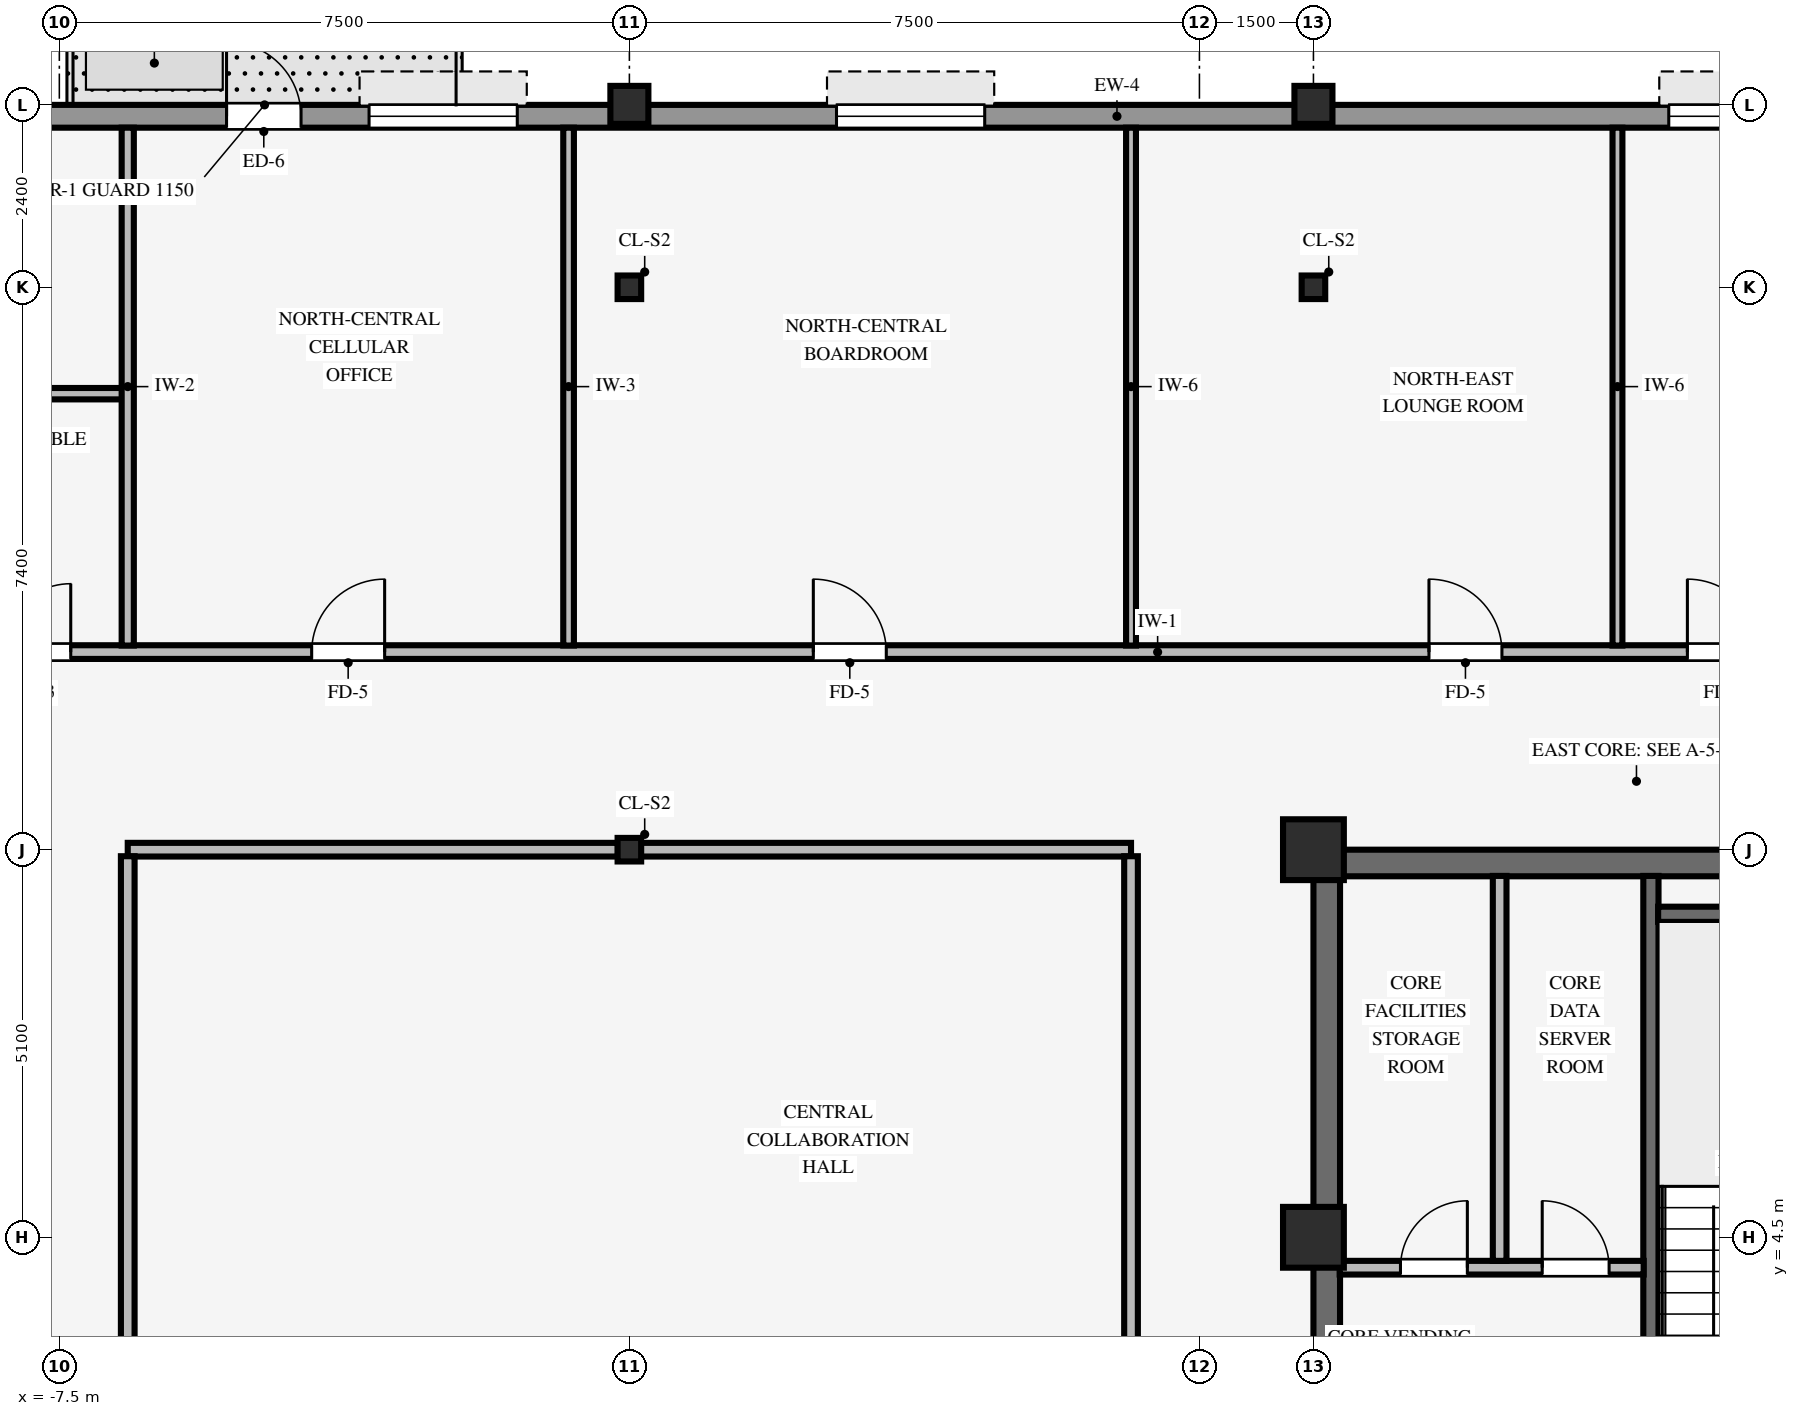
"""IFC4 building model, lengths in metres.
Left out: names, types, materials, properties, quantities, classifications, styles, units other than length and angle.
Written with IfcOpenShell. Run it as: python <this file> out.ifc"""

import sys

from ifc_helpers import new_model, si_unit, direction, frame, frame_2d, origin, origin_2d, place, context, subcontext, project, spatial, rectangle, hollow_rectangle, i_section, extrude, source, transform, mapped, element, fill, save


model = new_model("IFC4")
c1 = context("Model", 3, precision=1e-05, world=origin(), true_north=direction((0.0, 1.0)))
c2 = subcontext(c1, "Body", "Model", "MODEL_VIEW")
j1 = project(units=[si_unit("LENGTHUNIT", "METRE"), si_unit("PLANEANGLEUNIT", "RADIAN")], contexts=[c1])
p1 = place(None, origin())
s1 = spatial("IfcSite", under=j1, at=p1, CompositionType="ELEMENT")
p2 = place(p1, origin())
s2 = spatial("IfcBuilding", under=s1, at=p2, CompositionType="ELEMENT")
p3 = place(p2, frame((0.0, 0.0, 257.95)))
s3 = spatial("IfcBuildingStorey", under=s2, at=p3, CompositionType="ELEMENT", Elevation=257.95)
p4 = place(p3, frame((9.0, 9.425, 0.0), z_axis=(0.0, 0.0, 1.0), x_axis=(1.0, 0.0, 0.0)))
e1 = element("IfcWall", 1, at=p4, inside=s3, PredefinedType="SHEAR", context=c2, shape_type="SweptSolid", body=[
    extrude(rectangle(XDim=8.5, YDim=0.35, at=frame_2d((4.25, 0.0))), origin(), (0.0, 0.0, 1.0), 3.37),
])
p5 = place(p3, frame((9.175, -9.255, 0.0), z_axis=(0.0, 0.0, 1.0), x_axis=(0.0, 1.0, 0.0)))
e2 = element("IfcWall", 2, at=p5, inside=s3, PredefinedType="SHEAR", context=c2, shape_type="SweptSolid", body=[
    extrude(rectangle(XDim=18.51, YDim=0.35, at=frame_2d((9.255, 0.0))), origin(), (0.0, 0.0, 1.0), 3.37),
])
p6 = place(p5, frame((8.655, 0.0, 0.0)))
e3 = element("IfcOpeningElement", 3, at=p6, cuts=e2, PredefinedType="OPENING", context=c2, shape_type="SweptSolid", body=[
    extrude(rectangle(XDim=1.2, YDim=2.15, at=frame_2d((0.6, 1.075))), frame((0.0, 0.185, 0.0), z_axis=(0.0, -1.0, 0.0), x_axis=(1.0, 0.0, 0.0)), (0.0, 0.0, 1.0), 0.37),
])
for number, where, z_axis, x_axis in (
    (4, (9.0, 4.5, 0.0), (0.0, 0.0, 1.0), (1.0, 0.0, 0.0)),
    (5, (9.0, 9.6, 0.0), (0.0, 0.0, 1.0), (1.0, 0.0, 0.0)),
):
    element("IfcColumn", number, at=place(p3, frame(where, z_axis=z_axis, x_axis=x_axis)), inside=s3, PredefinedType="COLUMN", context=c2, shape_type="SweptSolid", body=[
        extrude(rectangle(XDim=0.8, YDim=0.8, at=origin_2d()), origin(), (0.0, 0.0, 1.0), 3.37),
    ])
for number, where, z_axis, x_axis in (
    (6, (0.0, 19.4, 0.0), (0.0, 0.0, 1.0), (1.0, 0.0, 0.0)),
    (7, (9.0, 19.4, 0.0), (0.0, 0.0, 1.0), (1.0, 0.0, 0.0)),
):
    element("IfcColumn", number, at=place(p3, frame(where, z_axis=z_axis, x_axis=x_axis)), inside=s3, PredefinedType="COLUMN", context=c2, shape_type="SweptSolid", body=[
        extrude(hollow_rectangle(XDim=0.5, YDim=0.5, WallThickness=0.032, InnerFilletRadius=0.032, OuterFilletRadius=0.064, at=origin_2d()), origin(), (0.0, 0.0, 1.0), 3.37),
    ])
for number, where, z_axis, x_axis in (
    (8, (0.0, 9.6, 0.0), (0.0, 0.0, 1.0), (1.0, 0.0, 0.0)),
    (9, (0.0, 17.0, 0.0), (0.0, 0.0, 1.0), (1.0, 0.0, 0.0)),
    (10, (9.0, 17.0, 0.0), (0.0, 0.0, 1.0), (1.0, 0.0, 0.0)),
):
    element("IfcColumn", number, at=place(p3, frame(where, z_axis=z_axis, x_axis=x_axis)), inside=s3, PredefinedType="COLUMN", context=c2, shape_type="SweptSolid", body=[
        extrude(i_section(OverallWidth=0.31, OverallDepth=0.31, WebThickness=0.015, FlangeThickness=0.015, FilletRadius=0.015, at=origin_2d()), origin(), (0.0, 0.0, 1.0), 3.37),
    ])
p7 = place(p3, frame((-18.9, 19.25, 0.0), z_axis=(0.0, 0.0, 1.0), x_axis=(1.0, 0.0, 0.0)))
e11 = element("IfcWall", 11, at=p7, inside=s3, PredefinedType="STANDARD", context=c2, shape_type="SweptSolid", body=[
    extrude(rectangle(XDim=35.6, YDim=0.3, at=frame_2d((17.8, 0.0))), origin(), (0.0, 0.0, 1.0), 2.705),
])
p8 = place(p7, frame((13.6, 0.0, 0.0)))
e12 = element("IfcOpeningElement", 12, at=p8, cuts=e11, PredefinedType="OPENING", context=c2, shape_type="SweptSolid", body=[
    extrude(rectangle(XDim=0.98, YDim=2.15, at=frame_2d((0.49, 1.075))), frame((0.0, 0.16, 0.0), z_axis=(0.0, -1.0, 0.0), x_axis=(1.0, 0.0, 0.0)), (0.0, 0.0, 1.0), 0.32),
])
p9 = place(p7, frame((2.425, 0.0, 0.8)))
e13 = element("IfcOpeningElement", 13, at=p9, cuts=e11, PredefinedType="OPENING", context=c2, shape_type="SweptSolid", body=[
    extrude(rectangle(XDim=1.95, YDim=1.48, at=frame_2d((0.975, 0.74))), frame((0.0, 0.16, 0.0), z_axis=(0.0, -1.0, 0.0), x_axis=(1.0, 0.0, 0.0)), (0.0, 0.0, 1.0), 0.32),
])
p10 = place(p7, frame((7.225, 0.0, 0.8)))
e14 = element("IfcOpeningElement", 14, at=p10, cuts=e11, PredefinedType="OPENING", context=c2, shape_type="SweptSolid", body=[
    extrude(rectangle(XDim=1.95, YDim=1.48, at=frame_2d((0.975, 0.74))), frame((0.0, 0.16, 0.0), z_axis=(0.0, -1.0, 0.0), x_axis=(1.0, 0.0, 0.0)), (0.0, 0.0, 1.0), 0.32),
])
p11 = place(p7, frame((15.475, 0.0, 0.8)))
e15 = element("IfcOpeningElement", 15, at=p11, cuts=e11, PredefinedType="OPENING", context=c2, shape_type="SweptSolid", body=[
    extrude(rectangle(XDim=1.95, YDim=1.48, at=frame_2d((0.975, 0.74))), frame((0.0, 0.16, 0.0), z_axis=(0.0, -1.0, 0.0), x_axis=(1.0, 0.0, 0.0)), (0.0, 0.0, 1.0), 0.32),
])
p12 = place(p7, frame((21.625, 0.0, 0.8)))
e16 = element("IfcOpeningElement", 16, at=p12, cuts=e11, PredefinedType="OPENING", context=c2, shape_type="SweptSolid", body=[
    extrude(rectangle(XDim=1.95, YDim=1.48, at=frame_2d((0.975, 0.74))), frame((0.0, 0.16, 0.0), z_axis=(0.0, -1.0, 0.0), x_axis=(1.0, 0.0, 0.0)), (0.0, 0.0, 1.0), 0.32),
])
p13 = place(p7, frame((32.575, 0.0, 0.8)))
e17 = element("IfcOpeningElement", 17, at=p13, cuts=e11, PredefinedType="OPENING", context=c2, shape_type="SweptSolid", body=[
    extrude(rectangle(XDim=1.95, YDim=1.48, at=frame_2d((0.975, 0.74))), frame((0.0, 0.16, 0.0), z_axis=(0.0, -1.0, 0.0), x_axis=(1.0, 0.0, 0.0)), (0.0, 0.0, 1.0), 0.32),
])
p14 = place(p3, frame((13.44, 0.9, 0.0), z_axis=(0.0, 0.0, 1.0), x_axis=(0.0, 1.0, 0.0)))
e18 = element("IfcWall", 18, at=p14, inside=s3, PredefinedType="SHEAR", context=c2, shape_type="SweptSolid", body=[
    extrude(rectangle(XDim=8.355, YDim=0.2, at=frame_2d((4.177, 0.0))), origin(), (0.0, 0.0, 1.0), 3.37),
])
p15 = place(p14, frame((0.43, 0.0, 0.0)))
e19 = element("IfcOpeningElement", 19, at=p15, cuts=e18, PredefinedType="OPENING", context=c2, shape_type="SweptSolid", body=[
    extrude(rectangle(XDim=1.1, YDim=2.15, at=frame_2d((0.55, 1.075))), frame((0.0, 0.11, 0.0), z_axis=(0.0, -1.0, 0.0), x_axis=(1.0, 0.0, 0.0)), (0.0, 0.0, 1.0), 0.22),
])
p16 = place(p3, frame((13.535, 8.75, 0.0), z_axis=(0.0, 0.0, 1.0), x_axis=(1.0, 0.0, 0.0)))
e20 = element("IfcWall", 20, at=p16, inside=s3, PredefinedType="SHEAR", context=c2, shape_type="SweptSolid", body=[
    extrude(rectangle(XDim=3.62, YDim=0.2, at=frame_2d((1.81, 0.0))), origin(), (0.0, 0.0, 1.0), 3.37),
])
p17 = place(p3, frame((9.345, 4.1, 0.0), z_axis=(0.0, 0.0, 1.0), x_axis=(1.0, 0.0, 0.0)))
e21 = element("IfcWall", 21, at=p17, inside=s3, PredefinedType="PARTITIONING", context=c2, shape_type="SweptSolid", body=[
    extrude(rectangle(XDim=4.0, YDim=0.18, at=frame_2d((2.0, 0.0))), origin(), (0.0, 0.0, 1.0), 3.36),
])
p18 = place(p17, frame((0.8, 0.0, 0.0)))
e22 = element("IfcOpeningElement", 22, at=p18, cuts=e21, PredefinedType="OPENING", context=c2, shape_type="SweptSolid", body=[
    extrude(rectangle(XDim=0.88, YDim=2.1, at=frame_2d((0.44, 1.05))), frame((0.0, 0.1, 0.0), z_axis=(0.0, -1.0, 0.0), x_axis=(1.0, 0.0, 0.0)), (0.0, 0.0, 1.0), 0.2),
])
p19 = place(p17, frame((2.665, 0.0, 0.0)))
e23 = element("IfcOpeningElement", 23, at=p19, cuts=e21, PredefinedType="OPENING", context=c2, shape_type="SweptSolid", body=[
    extrude(rectangle(XDim=0.88, YDim=2.1, at=frame_2d((0.44, 1.05))), frame((0.0, 0.1, 0.0), z_axis=(0.0, -1.0, 0.0), x_axis=(1.0, 0.0, 0.0)), (0.0, 0.0, 1.0), 0.2),
])
p20 = place(p3, frame((11.45, 4.19, 0.0), z_axis=(0.0, 0.0, 1.0), x_axis=(0.0, 1.0, 0.0)))
e24 = element("IfcWall", 24, at=p20, inside=s3, PredefinedType="PARTITIONING", context=c2, shape_type="SweptSolid", body=[
    extrude(rectangle(XDim=5.065, YDim=0.18, at=frame_2d((2.532, 0.0))), origin(), (0.0, 0.0, 1.0), 3.36),
])
for number, where, z_axis, x_axis in (
    (25, (-6.6, 9.6, 0.0), (0.0, 0.0, 1.0), (1.0, 0.0, 0.0)),
    (26, (0.151, 9.6, 0.0), (0.0, 0.0, 1.0), (1.0, 0.0, 0.0)),
):
    element("IfcWall", number, at=place(p3, frame(where, z_axis=z_axis, x_axis=x_axis)), inside=s3, PredefinedType="PARTITIONING", context=c2, shape_type="SweptSolid", body=[
        extrude(rectangle(XDim=6.449, YDim=0.18, at=frame_2d((3.225, 0.0))), origin(), (0.0, 0.0, 1.0), 2.405),
    ])
p21 = place(p3, frame((-9.0, 12.2, 0.0), z_axis=(0.0, 0.0, 1.0), x_axis=(1.0, 0.0, 0.0)))
e27 = element("IfcWall", 27, at=p21, inside=s3, PredefinedType="PARTITIONING", context=c2, shape_type="SweptSolid", body=[
    extrude(rectangle(XDim=24.8, YDim=0.18, at=frame_2d((12.4, 0.0))), origin(), (0.0, 0.0, 1.0), 3.36),
])
p22 = place(p21, frame((11.42, 0.0, 0.0)))
e28 = element("IfcOpeningElement", 28, at=p22, cuts=e27, PredefinedType="OPENING", context=c2, shape_type="SweptSolid", body=[
    extrude(rectangle(XDim=0.96, YDim=2.1, at=frame_2d((0.48, 1.05))), frame((0.0, 0.1, 0.0), z_axis=(0.0, -1.0, 0.0), x_axis=(1.0, 0.0, 0.0)), (0.0, 0.0, 1.0), 0.2),
])
p23 = place(p21, frame((4.82, 0.0, 0.0)))
e29 = element("IfcOpeningElement", 29, at=p23, cuts=e27, PredefinedType="OPENING", context=c2, shape_type="SweptSolid", body=[
    extrude(rectangle(XDim=0.96, YDim=2.1, at=frame_2d((0.48, 1.05))), frame((0.0, 0.1, 0.0), z_axis=(0.0, -1.0, 0.0), x_axis=(1.0, 0.0, 0.0)), (0.0, 0.0, 1.0), 0.2),
])
p24 = place(p21, frame((19.52, 0.0, 0.0)))
e30 = element("IfcOpeningElement", 30, at=p24, cuts=e27, PredefinedType="OPENING", context=c2, shape_type="SweptSolid", body=[
    extrude(rectangle(XDim=0.96, YDim=2.1, at=frame_2d((0.48, 1.05))), frame((0.0, 0.1, 0.0), z_axis=(0.0, -1.0, 0.0), x_axis=(1.0, 0.0, 0.0)), (0.0, 0.0, 1.0), 0.2),
])
p25 = place(p21, frame((22.92, 0.0, 0.0)))
e31 = element("IfcOpeningElement", 31, at=p25, cuts=e27, PredefinedType="OPENING", context=c2, shape_type="SweptSolid", body=[
    extrude(rectangle(XDim=0.96, YDim=2.1, at=frame_2d((0.48, 1.05))), frame((0.0, 0.1, 0.0), z_axis=(0.0, -1.0, 0.0), x_axis=(1.0, 0.0, 0.0)), (0.0, 0.0, 1.0), 0.2),
])
p26 = place(p21, frame((0.75, 0.0, 0.0)))
e32 = element("IfcOpeningElement", 32, at=p26, cuts=e27, PredefinedType="OPENING", context=c2, shape_type="SweptSolid", body=[
    extrude(rectangle(XDim=0.9, YDim=2.1, at=frame_2d((0.45, 1.05))), frame((0.0, 0.1, 0.0), z_axis=(0.0, -1.0, 0.0), x_axis=(1.0, 0.0, 0.0)), (0.0, 0.0, 1.0), 0.2),
])
p27 = place(p3, frame((-14.8, 15.6, 0.0), z_axis=(0.0, 0.0, 1.0), x_axis=(1.0, 0.0, 0.0)))
e33 = element("IfcWall", 33, at=p27, inside=s3, PredefinedType="PARTITIONING", context=c2, shape_type="SweptSolid", body=[
    extrude(rectangle(XDim=8.129, YDim=0.15, at=frame_2d((4.064, 0.0))), origin(), (0.0, 0.0, 1.0), 3.36),
])
p28 = place(p3, frame((-6.6, 1.336, 0.0), z_axis=(0.0, 0.0, 1.0), x_axis=(0.0, 1.0, 0.0)))
e34 = element("IfcWall", 34, at=p28, inside=s3, PredefinedType="PARTITIONING", context=c2, shape_type="SweptSolid", body=[
    extrude(rectangle(XDim=8.178, YDim=0.18, at=frame_2d((4.089, 0.0))), origin(), (0.0, 0.0, 1.0), 3.36),
])
p29 = place(p3, frame((-6.6, 12.286, 0.0), z_axis=(0.0, 0.0, 1.0), x_axis=(0.0, 1.0, 0.0)))
e35 = element("IfcWall", 35, at=p29, inside=s3, PredefinedType="PARTITIONING", context=c2, shape_type="SweptSolid", body=[
    extrude(rectangle(XDim=6.814, YDim=0.16, at=frame_2d((3.407, 0.0))), origin(), (0.0, 0.0, 1.0), 3.36),
])
p30 = place(p3, frame((-0.8, 12.286, 0.0), z_axis=(0.0, 0.0, 1.0), x_axis=(0.0, 1.0, 0.0)))
e36 = element("IfcWall", 36, at=p30, inside=s3, PredefinedType="PARTITIONING", context=c2, shape_type="SweptSolid", body=[
    extrude(rectangle(XDim=6.814, YDim=0.14, at=frame_2d((3.407, 0.0))), origin(), (0.0, 0.0, 1.0), 3.36),
])
p31 = place(p3, frame((6.6, 1.336, 0.0), z_axis=(0.0, 0.0, 1.0), x_axis=(0.0, 1.0, 0.0)))
e37 = element("IfcWall", 37, at=p31, inside=s3, PredefinedType="PARTITIONING", context=c2, shape_type="SweptSolid", body=[
    extrude(rectangle(XDim=8.178, YDim=0.18, at=frame_2d((4.089, 0.0))), origin(), (0.0, 0.0, 1.0), 3.36),
])
for number, where, z_axis, x_axis in (
    (38, (6.6, 12.286, 0.0), (0.0, 0.0, 1.0), (0.0, 1.0, 0.0)),
    (39, (13.0, 12.286, 0.0), (0.0, 0.0, 1.0), (0.0, 1.0, 0.0)),
):
    element("IfcWall", number, at=place(p3, frame(where, z_axis=z_axis, x_axis=x_axis)), inside=s3, PredefinedType="PARTITIONING", context=c2, shape_type="SweptSolid", body=[
        extrude(rectangle(XDim=6.814, YDim=0.13, at=frame_2d((3.407, 0.0))), origin(), (0.0, 0.0, 1.0), 3.36),
    ])
m1 = source(origin(), c2, "Body", "SweptSolid", [
    extrude(rectangle(XDim=0.98, YDim=2.15, at=frame_2d((0.49, 1.075))), frame((0.0, 0.025, 0.0), z_axis=(0.0, -1.0, 0.0), x_axis=(1.0, 0.0, 0.0)), (0.0, 0.0, 1.0), 0.05),
])
p32 = place(p8, origin())
e40 = element("IfcDoor", 40, at=p32, inside=s3, OperationType="SINGLE_SWING_LEFT", PredefinedType="DOOR", context=c2, shape_type="MappedRepresentation", body=[
    mapped(m1, transform((0.0, 0.0, 0.0), scale=1.0)),
])
fill(e12, e40)
m2 = source(origin(), c2, "Body", "SweptSolid", [
    extrude(rectangle(XDim=1.95, YDim=1.48, at=frame_2d((0.975, 0.74))), frame((0.0, 0.03, 0.0), z_axis=(0.0, -1.0, 0.0), x_axis=(1.0, 0.0, 0.0)), (0.0, 0.0, 1.0), 0.06),
])
p33 = place(p11, origin())
e41 = element("IfcWindow", 41, at=p33, inside=s3, PartitioningType="SINGLE_PANEL", PredefinedType="WINDOW", context=c2, shape_type="MappedRepresentation", body=[
    mapped(m2, transform((0.0, 0.0, 0.0), scale=1.0)),
])
fill(e15, e41)
p34 = place(p12, origin())
e42 = element("IfcWindow", 42, at=p34, inside=s3, PartitioningType="SINGLE_PANEL", PredefinedType="WINDOW", context=c2, shape_type="MappedRepresentation", body=[
    mapped(m2, transform((0.0, 0.0, 0.0), scale=1.0)),
])
fill(e16, e42)
p35 = place(p13, origin())
e43 = element("IfcWindow", 43, at=p35, inside=s3, PartitioningType="SINGLE_PANEL", PredefinedType="WINDOW", context=c2, shape_type="MappedRepresentation", body=[
    mapped(m2, transform((0.0, 0.0, 0.0), scale=1.0)),
])
fill(e17, e43)
m3 = source(origin(), c2, "Body", "SweptSolid", [
    extrude(rectangle(XDim=0.88, YDim=2.1, at=frame_2d((0.44, 1.05))), frame((0.0, 0.025, 0.0), z_axis=(0.0, -1.0, 0.0), x_axis=(1.0, 0.0, 0.0)), (0.0, 0.0, 1.0), 0.05),
])
p36 = place(p18, origin())
e44 = element("IfcDoor", 44, at=p36, inside=s3, OperationType="SINGLE_SWING_RIGHT", PredefinedType="DOOR", context=c2, shape_type="MappedRepresentation", body=[
    mapped(m3, transform((0.0, 0.0, 0.0), scale=1.0)),
])
fill(e22, e44)
p37 = place(p19, origin())
e45 = element("IfcDoor", 45, at=p37, inside=s3, OperationType="SINGLE_SWING_LEFT", PredefinedType="DOOR", context=c2, shape_type="MappedRepresentation", body=[
    mapped(m3, transform((0.0, 0.0, 0.0), scale=1.0)),
])
fill(e23, e45)
m4 = source(origin(), c2, "Body", "SweptSolid", [
    extrude(rectangle(XDim=0.96, YDim=2.1, at=frame_2d((0.48, 1.05))), frame((0.0, 0.025, 0.0), z_axis=(0.0, -1.0, 0.0), x_axis=(1.0, 0.0, 0.0)), (0.0, 0.0, 1.0), 0.05),
])
p38 = place(p22, origin())
e46 = element("IfcDoor", 46, at=p38, inside=s3, OperationType="SINGLE_SWING_LEFT", PredefinedType="DOOR", context=c2, shape_type="MappedRepresentation", body=[
    mapped(m4, transform((0.0, 0.0, 0.0), scale=1.0)),
])
fill(e28, e46)
p39 = place(p23, origin())
e47 = element("IfcDoor", 47, at=p39, inside=s3, OperationType="SINGLE_SWING_RIGHT", PredefinedType="DOOR", context=c2, shape_type="MappedRepresentation", body=[
    mapped(m4, transform((0.0, 0.0, 0.0), scale=1.0)),
])
fill(e29, e47)
p40 = place(p24, origin())
e48 = element("IfcDoor", 48, at=p40, inside=s3, OperationType="SINGLE_SWING_LEFT", PredefinedType="DOOR", context=c2, shape_type="MappedRepresentation", body=[
    mapped(m4, transform((0.0, 0.0, 0.0), scale=1.0)),
])
fill(e30, e48)
p41 = place(p25, origin())
e49 = element("IfcDoor", 49, at=p41, inside=s3, OperationType="SINGLE_SWING_LEFT", PredefinedType="DOOR", context=c2, shape_type="MappedRepresentation", body=[
    mapped(m4, transform((0.0, 0.0, 0.0), scale=1.0)),
])
fill(e31, e49)
m5 = source(origin(), c2, "Body", "SweptSolid", [
    extrude(rectangle(XDim=0.9, YDim=2.1, at=frame_2d((0.45, 1.05))), frame((0.0, 0.025, 0.0), z_axis=(0.0, -1.0, 0.0), x_axis=(1.0, 0.0, 0.0)), (0.0, 0.0, 1.0), 0.05),
])
p42 = place(p26, origin())
e50 = element("IfcDoor", 50, at=p42, inside=s3, OperationType="SINGLE_SWING_RIGHT", PredefinedType="DOOR", context=c2, shape_type="MappedRepresentation", body=[
    mapped(m5, transform((0.0, 0.0, 0.0), scale=1.0)),
])
fill(e32, e50)
save(model, sys.argv[1])
